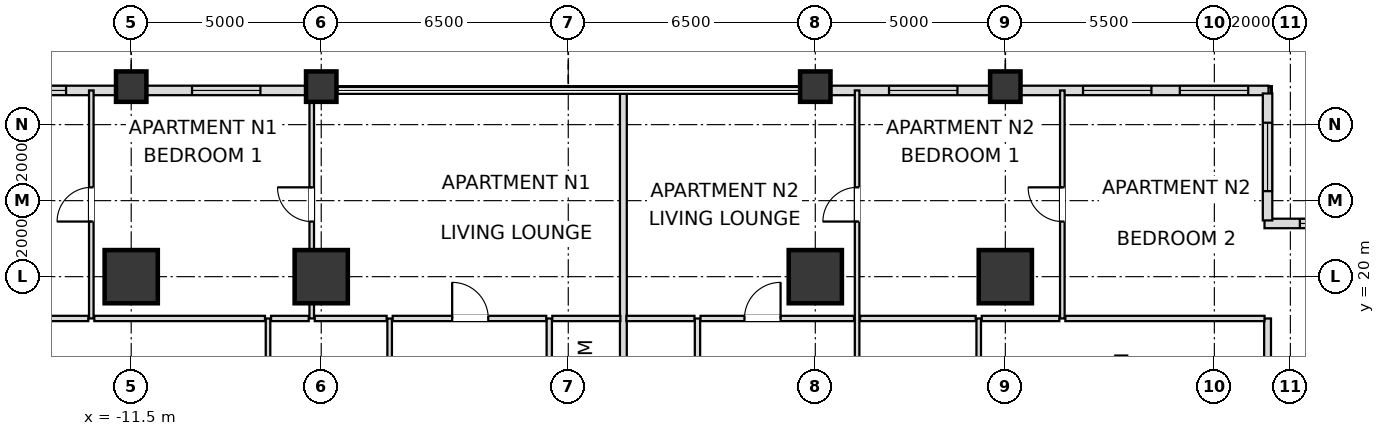
"""IFC4 building model, lengths in metres.
Left out: names, types, materials, properties, quantities, classifications, styles, units other than length and angle.
Written with IfcOpenShell. Run it as: python <this file> out.ifc"""

import sys

from ifc_helpers import new_model, si_unit, direction, frame, frame_2d, origin, origin_2d, place, context, subcontext, project, spatial, rectangle, extrude, element, fill, save


model = new_model("IFC4")
c1 = context("Model", 3, precision=1e-05, world=origin(), true_north=direction((0.0, 1.0)))
c2 = subcontext(c1, "Body", "Model", "MODEL_VIEW")
j1 = project(units=[si_unit("LENGTHUNIT", "METRE"), si_unit("PLANEANGLEUNIT", "RADIAN")], contexts=[c1])
p1 = place(None, origin())
s1 = spatial("IfcSite", under=j1, at=p1, CompositionType="ELEMENT")
p2 = place(p1, origin())
s2 = spatial("IfcBuilding", under=s1, at=p2, CompositionType="ELEMENT")
p3 = place(p2, frame((0.0, 0.0, 27.6)))
s3 = spatial("IfcBuildingStorey", under=s2, at=p3, CompositionType="ELEMENT", Elevation=27.6)
for number, where, z_axis, x_axis in (
    (1, (11.5, 20.0, 0.0), (0.0, 0.0, 1.0), (1.0, 0.0, 0.0)),
    (2, (6.5, 20.0, 0.0), (0.0, 0.0, 1.0), (1.0, 0.0, 0.0)),
    (3, (-6.5, 20.0, 0.0), (0.0, 0.0, 1.0), (1.0, 0.0, 0.0)),
    (4, (-11.5, 20.0, 0.0), (0.0, 0.0, 1.0), (1.0, 0.0, 0.0)),
):
    element("IfcColumn", number, at=place(p3, frame(where, z_axis=z_axis, x_axis=x_axis)), inside=s3, PredefinedType="USERDEFINED", context=c2, shape_type="SweptSolid", body=[
        extrude(rectangle(XDim=1.4, YDim=1.4, at=origin_2d()), origin(), (0.0, 0.0, 1.0), 4.8),
    ])
for number, where, z_axis, x_axis in (
    (5, (-11.5, 25.0, 0.0), (0.0, 0.0, 1.0), (1.0, 0.0, 0.0)),
    (6, (-6.5, 25.0, 0.0), (0.0, 0.0, 1.0), (1.0, 0.0, 0.0)),
    (7, (6.5, 25.0, 0.0), (0.0, 0.0, 1.0), (1.0, 0.0, 0.0)),
    (8, (11.5, 25.0, 0.0), (0.0, 0.0, 1.0), (1.0, 0.0, 0.0)),
):
    element("IfcColumn", number, at=place(p3, frame(where, z_axis=z_axis, x_axis=x_axis)), inside=s3, PredefinedType="COLUMN", context=c2, shape_type="SweptSolid", body=[
        extrude(rectangle(XDim=0.8, YDim=0.8, at=origin_2d()), origin(), (0.0, 0.0, 1.0), 4.8),
    ])
p4 = place(p3, frame((18.425, 24.9, 0.0), z_axis=(0.0, 0.0, 1.0), x_axis=(-1.0, 0.0, 0.0)))
e9 = element("IfcWall", 9, at=p4, inside=s3, PredefinedType="SOLIDWALL", context=c2, shape_type="SweptSolid", body=[
    extrude(rectangle(XDim=6.53, YDim=0.25, at=frame_2d((3.265, 0.0))), origin(), (0.0, 0.0, 1.0), 3.936),
])
p5 = place(p4, frame((0.534, 0.0, 0.72)))
e10 = element("IfcOpeningElement", 10, at=p5, cuts=e9, PredefinedType="OPENING", context=c2, shape_type="SweptSolid", body=[
    extrude(rectangle(XDim=1.8, YDim=1.68, at=frame_2d((0.9, 0.84))), frame((0.0, 0.135, 0.0), z_axis=(0.0, -1.0, 0.0), x_axis=(1.0, 0.0, 0.0)), (0.0, 0.0, 1.0), 0.27),
])
p6 = place(p4, frame((3.081, 0.0, 0.72)))
e11 = element("IfcOpeningElement", 11, at=p6, cuts=e9, PredefinedType="OPENING", context=c2, shape_type="SweptSolid", body=[
    extrude(rectangle(XDim=1.8, YDim=1.68, at=frame_2d((0.9, 0.84))), frame((0.0, 0.135, 0.0), z_axis=(0.0, -1.0, 0.0), x_axis=(1.0, 0.0, 0.0)), (0.0, 0.0, 1.0), 0.27),
])
p7 = place(p3, frame((11.105, 24.9, 0.0), z_axis=(0.0, 0.0, 1.0), x_axis=(-1.0, 0.0, 0.0)))
e12 = element("IfcWall", 12, at=p7, inside=s3, PredefinedType="SOLIDWALL", context=c2, shape_type="SweptSolid", body=[
    extrude(rectangle(XDim=4.21, YDim=0.25, at=frame_2d((2.105, 0.0))), origin(), (0.0, 0.0, 1.0), 3.936),
])
p8 = place(p7, frame((0.865, 0.0, 0.72)))
e13 = element("IfcOpeningElement", 13, at=p8, cuts=e12, PredefinedType="OPENING", context=c2, shape_type="SweptSolid", body=[
    extrude(rectangle(XDim=1.8, YDim=1.68, at=frame_2d((0.9, 0.84))), frame((0.0, 0.135, 0.0), z_axis=(0.0, -1.0, 0.0), x_axis=(1.0, 0.0, 0.0)), (0.0, 0.0, 1.0), 0.27),
])
p9 = place(p3, frame((-6.895, 24.9, 0.0), z_axis=(0.0, 0.0, 1.0), x_axis=(-1.0, 0.0, 0.0)))
e14 = element("IfcWall", 14, at=p9, inside=s3, PredefinedType="SOLIDWALL", context=c2, shape_type="SweptSolid", body=[
    extrude(rectangle(XDim=4.21, YDim=0.25, at=frame_2d((2.105, 0.0))), origin(), (0.0, 0.0, 1.0), 3.936),
])
p10 = place(p9, frame((1.205, 0.0, 0.72)))
e15 = element("IfcOpeningElement", 15, at=p10, cuts=e14, PredefinedType="OPENING", context=c2, shape_type="SweptSolid", body=[
    extrude(rectangle(XDim=1.8, YDim=1.68, at=frame_2d((0.9, 0.84))), frame((0.0, 0.135, 0.0), z_axis=(0.0, -1.0, 0.0), x_axis=(1.0, 0.0, 0.0)), (0.0, 0.0, 1.0), 0.27),
])
p11 = place(p3, frame((-11.895, 24.9, 0.0), z_axis=(0.0, 0.0, 1.0), x_axis=(-1.0, 0.0, 0.0)))
e16 = element("IfcWall", 16, at=p11, inside=s3, PredefinedType="SOLIDWALL", context=c2, shape_type="SweptSolid", body=[
    extrude(rectangle(XDim=6.53, YDim=0.25, at=frame_2d((3.265, 0.0))), origin(), (0.0, 0.0, 1.0), 3.936),
])
p12 = place(p11, frame((1.319, 0.0, 0.72)))
e17 = element("IfcOpeningElement", 17, at=p12, cuts=e16, PredefinedType="OPENING", context=c2, shape_type="SweptSolid", body=[
    extrude(rectangle(XDim=1.8, YDim=1.68, at=frame_2d((0.9, 0.84))), frame((0.0, 0.135, 0.0), z_axis=(0.0, -1.0, 0.0), x_axis=(1.0, 0.0, 0.0)), (0.0, 0.0, 1.0), 0.27),
])
p13 = place(p11, frame((4.086, 0.0, 0.72)))
e18 = element("IfcOpeningElement", 18, at=p13, cuts=e16, PredefinedType="OPENING", context=c2, shape_type="SweptSolid", body=[
    extrude(rectangle(XDim=1.8, YDim=1.68, at=frame_2d((0.9, 0.84))), frame((0.0, 0.135, 0.0), z_axis=(0.0, -1.0, 0.0), x_axis=(1.0, 0.0, 0.0)), (0.0, 0.0, 1.0), 0.27),
])
p14 = place(p3, frame((21.98, 21.4, 0.0), z_axis=(0.0, 0.0, 1.0), x_axis=(-1.0, 0.0, 0.0)))
e19 = element("IfcWall", 19, at=p14, inside=s3, PredefinedType="SOLIDWALL", context=c2, shape_type="SweptSolid", body=[
    extrude(rectangle(XDim=3.66, YDim=0.25, at=frame_2d((1.83, 0.0))), origin(), (0.0, 0.0, 1.0), 3.936),
])
p15 = place(p14, frame((0.93, 0.0, 0.72)))
e20 = element("IfcOpeningElement", 20, at=p15, cuts=e19, PredefinedType="OPENING", context=c2, shape_type="SweptSolid", body=[
    extrude(rectangle(XDim=1.8, YDim=1.68, at=frame_2d((0.9, 0.84))), frame((0.0, 0.135, 0.0), z_axis=(0.0, -1.0, 0.0), x_axis=(1.0, 0.0, 0.0)), (0.0, 0.0, 1.0), 0.27),
])
p16 = place(p3, frame((18.4, 21.48, 0.0), z_axis=(0.0, 0.0, 1.0), x_axis=(0.0, 1.0, 0.0)))
e21 = element("IfcWall", 21, at=p16, inside=s3, PredefinedType="SOLIDWALL", context=c2, shape_type="SweptSolid", body=[
    extrude(rectangle(XDim=3.34, YDim=0.25, at=frame_2d((1.67, 0.0))), origin(), (0.0, 0.0, 1.0), 3.936),
])
p17 = place(p16, frame((0.77, 0.0, 0.72)))
e22 = element("IfcOpeningElement", 22, at=p17, cuts=e21, PredefinedType="OPENING", context=c2, shape_type="SweptSolid", body=[
    extrude(rectangle(XDim=1.8, YDim=1.68, at=frame_2d((0.9, 0.84))), frame((0.0, 0.135, 0.0), z_axis=(0.0, -1.0, 0.0), x_axis=(1.0, 0.0, 0.0)), (0.0, 0.0, 1.0), 0.27),
])
p18 = place(p3, frame((-12.55, 18.9, 0.0), z_axis=(0.0, 0.0, 1.0), x_axis=(0.0, 1.0, 0.0)))
e23 = element("IfcWall", 23, at=p18, inside=s3, PredefinedType="PARTITIONING", context=c2, shape_type="SweptSolid", body=[
    extrude(rectangle(XDim=6.0, YDim=0.12, at=frame_2d((3.0, 0.0))), origin(), (0.0, 0.0, 1.0), 3.936),
])
p19 = place(p18, frame((2.55, 0.0, 0.0)))
e24 = element("IfcOpeningElement", 24, at=p19, cuts=e23, PredefinedType="OPENING", context=c2, shape_type="SweptSolid", body=[
    extrude(rectangle(XDim=0.9, YDim=2.1, at=frame_2d((0.45, 1.05))), frame((0.0, 0.07, 0.0), z_axis=(0.0, -1.0, 0.0), x_axis=(1.0, 0.0, 0.0)), (0.0, 0.0, 1.0), 0.14),
])
p20 = place(p3, frame((-7.9, 9.3, 0.0), z_axis=(0.0, 0.0, 1.0), x_axis=(0.0, 1.0, 0.0)))
e25 = element("IfcWall", 25, at=p20, inside=s3, PredefinedType="PARTITIONING", context=c2, shape_type="SweptSolid", body=[
    extrude(rectangle(XDim=9.6, YDim=0.12, at=frame_2d((4.8, 0.0))), origin(), (0.0, 0.0, 1.0), 4.016),
])
p21 = place(p20, frame((4.35, 0.0, 0.0)))
e26 = element("IfcOpeningElement", 26, at=p21, cuts=e25, PredefinedType="OPENING", context=c2, shape_type="SweptSolid", body=[
    extrude(rectangle(XDim=0.9, YDim=2.1, at=frame_2d((0.45, 1.05))), frame((0.0, 0.07, 0.0), z_axis=(0.0, -1.0, 0.0), x_axis=(1.0, 0.0, 0.0)), (0.0, 0.0, 1.0), 0.14),
])
p22 = place(p3, frame((-6.75, 18.9, 0.0), z_axis=(0.0, 0.0, 1.0), x_axis=(0.0, 1.0, 0.0)))
e27 = element("IfcWall", 27, at=p22, inside=s3, PredefinedType="PARTITIONING", context=c2, shape_type="SweptSolid", body=[
    extrude(rectangle(XDim=6.0, YDim=0.12, at=frame_2d((3.0, 0.0))), origin(), (0.0, 0.0, 1.0), 4.016),
])
p23 = place(p22, frame((2.55, 0.0, 0.0)))
e28 = element("IfcOpeningElement", 28, at=p23, cuts=e27, PredefinedType="OPENING", context=c2, shape_type="SweptSolid", body=[
    extrude(rectangle(XDim=0.9, YDim=2.1, at=frame_2d((0.45, 1.05))), frame((0.0, 0.07, 0.0), z_axis=(0.0, -1.0, 0.0), x_axis=(1.0, 0.0, 0.0)), (0.0, 0.0, 1.0), 0.14),
])
p24 = place(p3, frame((-4.7, 9.3, 0.0), z_axis=(0.0, 0.0, 1.0), x_axis=(0.0, 1.0, 0.0)))
e29 = element("IfcWall", 29, at=p24, inside=s3, PredefinedType="PARTITIONING", context=c2, shape_type="SweptSolid", body=[
    extrude(rectangle(XDim=9.6, YDim=0.12, at=frame_2d((4.8, 0.0))), origin(), (0.0, 0.0, 1.0), 4.148),
])
p25 = place(p24, frame((4.325, 0.0, 0.0)))
e30 = element("IfcOpeningElement", 30, at=p25, cuts=e29, PredefinedType="OPENING", context=c2, shape_type="SweptSolid", body=[
    extrude(rectangle(XDim=0.95, YDim=2.1, at=frame_2d((0.475, 1.05))), frame((0.0, 0.07, 0.0), z_axis=(0.0, -1.0, 0.0), x_axis=(1.0, 0.0, 0.0)), (0.0, 0.0, 1.0), 0.14),
])
p26 = place(p3, frame((-0.5, 9.3, 0.0), z_axis=(0.0, 0.0, 1.0), x_axis=(0.0, 1.0, 0.0)))
e31 = element("IfcWall", 31, at=p26, inside=s3, PredefinedType="PARTITIONING", context=c2, shape_type="SweptSolid", body=[
    extrude(rectangle(XDim=9.6, YDim=0.14, at=frame_2d((4.8, 0.0))), origin(), (0.0, 0.0, 1.0), 4.148),
])
p27 = place(p26, frame((4.35, 0.0, 0.0)))
e32 = element("IfcOpeningElement", 32, at=p27, cuts=e31, PredefinedType="OPENING", context=c2, shape_type="SweptSolid", body=[
    extrude(rectangle(XDim=0.9, YDim=2.1, at=frame_2d((0.45, 1.05))), frame((0.0, 0.08, 0.0), z_axis=(0.0, -1.0, 0.0), x_axis=(1.0, 0.0, 0.0)), (0.0, 0.0, 1.0), 0.16),
])
p28 = place(p3, frame((1.45, 9.3, 0.0), z_axis=(0.0, 0.0, 1.0), x_axis=(0.0, 1.0, 0.0)))
e33 = element("IfcWall", 33, at=p28, inside=s3, PredefinedType="PARTITIONING", context=c2, shape_type="SweptSolid", body=[
    extrude(rectangle(XDim=15.6, YDim=0.18, at=frame_2d((7.8, 0.0))), origin(), (0.0, 0.0, 1.0), 4.016),
])
p29 = place(p3, frame((3.4, 9.3, 0.0), z_axis=(0.0, 0.0, 1.0), x_axis=(0.0, 1.0, 0.0)))
e34 = element("IfcWall", 34, at=p29, inside=s3, PredefinedType="PARTITIONING", context=c2, shape_type="SweptSolid", body=[
    extrude(rectangle(XDim=9.6, YDim=0.14, at=frame_2d((4.8, 0.0))), origin(), (0.0, 0.0, 1.0), 4.148),
])
p30 = place(p29, frame((4.35, 0.0, 0.0)))
e35 = element("IfcOpeningElement", 35, at=p30, cuts=e34, PredefinedType="OPENING", context=c2, shape_type="SweptSolid", body=[
    extrude(rectangle(XDim=0.9, YDim=2.1, at=frame_2d((0.45, 1.05))), frame((0.0, 0.08, 0.0), z_axis=(0.0, -1.0, 0.0), x_axis=(1.0, 0.0, 0.0)), (0.0, 0.0, 1.0), 0.16),
])
p31 = place(p3, frame((7.6, 9.3, 0.0), z_axis=(0.0, 0.0, 1.0), x_axis=(0.0, 1.0, 0.0)))
e36 = element("IfcWall", 36, at=p31, inside=s3, PredefinedType="PARTITIONING", context=c2, shape_type="SweptSolid", body=[
    extrude(rectangle(XDim=15.6, YDim=0.12, at=frame_2d((7.8, 0.0))), origin(), (0.0, 0.0, 1.0), 4.016),
])
p32 = place(p31, frame((4.325, 0.0, 0.0)))
e37 = element("IfcOpeningElement", 37, at=p32, cuts=e36, PredefinedType="OPENING", context=c2, shape_type="SweptSolid", body=[
    extrude(rectangle(XDim=0.95, YDim=2.1, at=frame_2d((0.475, 1.05))), frame((0.0, 0.07, 0.0), z_axis=(0.0, -1.0, 0.0), x_axis=(1.0, 0.0, 0.0)), (0.0, 0.0, 1.0), 0.14),
])
p33 = place(p31, frame((12.15, 0.0, 0.0)))
e38 = element("IfcOpeningElement", 38, at=p33, cuts=e36, PredefinedType="OPENING", context=c2, shape_type="SweptSolid", body=[
    extrude(rectangle(XDim=0.9, YDim=2.1, at=frame_2d((0.45, 1.05))), frame((0.0, 0.07, 0.0), z_axis=(0.0, -1.0, 0.0), x_axis=(1.0, 0.0, 0.0)), (0.0, 0.0, 1.0), 0.14),
])
p34 = place(p3, frame((10.8, 9.3, 0.0), z_axis=(0.0, 0.0, 1.0), x_axis=(0.0, 1.0, 0.0)))
e39 = element("IfcWall", 39, at=p34, inside=s3, PredefinedType="PARTITIONING", context=c2, shape_type="SweptSolid", body=[
    extrude(rectangle(XDim=9.6, YDim=0.12, at=frame_2d((4.8, 0.0))), origin(), (0.0, 0.0, 1.0), 4.016),
])
p35 = place(p34, frame((4.325, 0.0, 0.0)))
e40 = element("IfcOpeningElement", 40, at=p35, cuts=e39, PredefinedType="OPENING", context=c2, shape_type="SweptSolid", body=[
    extrude(rectangle(XDim=0.95, YDim=2.1, at=frame_2d((0.475, 1.05))), frame((0.0, 0.07, 0.0), z_axis=(0.0, -1.0, 0.0), x_axis=(1.0, 0.0, 0.0)), (0.0, 0.0, 1.0), 0.14),
])
p36 = place(p3, frame((13.0, 18.9, 0.0), z_axis=(0.0, 0.0, 1.0), x_axis=(0.0, 1.0, 0.0)))
e41 = element("IfcWall", 41, at=p36, inside=s3, PredefinedType="PARTITIONING", context=c2, shape_type="SweptSolid", body=[
    extrude(rectangle(XDim=6.0, YDim=0.12, at=frame_2d((3.0, 0.0))), origin(), (0.0, 0.0, 1.0), 3.936),
])
p37 = place(p36, frame((2.55, 0.0, 0.0)))
e42 = element("IfcOpeningElement", 42, at=p37, cuts=e41, PredefinedType="OPENING", context=c2, shape_type="SweptSolid", body=[
    extrude(rectangle(XDim=0.9, YDim=2.1, at=frame_2d((0.45, 1.05))), frame((0.0, 0.07, 0.0), z_axis=(0.0, -1.0, 0.0), x_axis=(1.0, 0.0, 0.0)), (0.0, 0.0, 1.0), 0.14),
])
p38 = place(p3, frame((18.4, 9.3, 0.0), z_axis=(0.0, 0.0, 1.0), x_axis=(0.0, 1.0, 0.0)))
e43 = element("IfcWall", 43, at=p38, inside=s3, PredefinedType="PARTITIONING", context=c2, shape_type="SweptSolid", body=[
    extrude(rectangle(XDim=9.6, YDim=0.18, at=frame_2d((4.8, 0.0))), origin(), (0.0, 0.0, 1.0), 3.936),
])
p39 = place(p3, frame((-18.32, 18.9, 0.0), z_axis=(0.0, 0.0, 1.0), x_axis=(1.0, 0.0, 0.0)))
e44 = element("IfcWall", 44, at=p39, inside=s3, PredefinedType="PARTITIONING", context=c2, shape_type="SweptSolid", body=[
    extrude(rectangle(XDim=5.69, YDim=0.14, at=frame_2d((2.845, 0.0))), origin(), (0.0, 0.0, 1.0), 3.936),
])
p40 = place(p3, frame((-12.47, 18.9, 0.0), z_axis=(0.0, 0.0, 1.0), x_axis=(1.0, 0.0, 0.0)))
e45 = element("IfcWall", 45, at=p40, inside=s3, PredefinedType="PARTITIONING", context=c2, shape_type="SweptSolid", body=[
    extrude(rectangle(XDim=4.49, YDim=0.14, at=frame_2d((2.245, 0.0))), origin(), (0.0, 0.0, 1.0), 3.936),
])
p41 = place(p3, frame((-7.82, 18.9, 0.0), z_axis=(0.0, 0.0, 1.0), x_axis=(1.0, 0.0, 0.0)))
e46 = element("IfcWall", 46, at=p41, inside=s3, PredefinedType="PARTITIONING", context=c2, shape_type="SweptSolid", body=[
    extrude(rectangle(XDim=0.99, YDim=0.14, at=frame_2d((0.495, 0.0))), origin(), (0.0, 0.0, 1.0), 4.58),
])
p42 = place(p3, frame((-6.67, 18.9, 0.0), z_axis=(0.0, 0.0, 1.0), x_axis=(1.0, 0.0, 0.0)))
e47 = element("IfcWall", 47, at=p42, inside=s3, PredefinedType="PARTITIONING", context=c2, shape_type="SweptSolid", body=[
    extrude(rectangle(XDim=1.89, YDim=0.14, at=frame_2d((0.945, 0.0))), origin(), (0.0, 0.0, 1.0), 4.016),
])
p43 = place(p3, frame((-4.62, 18.9, 0.0), z_axis=(0.0, 0.0, 1.0), x_axis=(1.0, 0.0, 0.0)))
e48 = element("IfcWall", 48, at=p43, inside=s3, PredefinedType="PARTITIONING", context=c2, shape_type="SweptSolid", body=[
    extrude(rectangle(XDim=4.04, YDim=0.14, at=frame_2d((2.02, 0.0))), origin(), (0.0, 0.0, 1.0), 4.58),
])
p44 = place(p43, frame((1.565, 0.0, 0.0)))
e49 = element("IfcOpeningElement", 49, at=p44, cuts=e48, PredefinedType="OPENING", context=c2, shape_type="SweptSolid", body=[
    extrude(rectangle(XDim=0.95, YDim=2.1, at=frame_2d((0.475, 1.05))), frame((0.0, 0.08, 0.0), z_axis=(0.0, -1.0, 0.0), x_axis=(1.0, 0.0, 0.0)), (0.0, 0.0, 1.0), 0.16),
])
for number, where, z_axis, x_axis in (
    (50, (-0.42, 18.9, 0.0), (0.0, 0.0, 1.0), (1.0, 0.0, 0.0)),
    (51, (1.53, 18.9, 0.0), (0.0, 0.0, 1.0), (1.0, 0.0, 0.0)),
):
    element("IfcWall", number, at=place(p3, frame(where, z_axis=z_axis, x_axis=x_axis)), inside=s3, PredefinedType="PARTITIONING", context=c2, shape_type="SweptSolid", body=[
        extrude(rectangle(XDim=1.79, YDim=0.14, at=frame_2d((0.895, 0.0))), origin(), (0.0, 0.0, 1.0), 4.58),
    ])
p45 = place(p3, frame((3.48, 18.9, 0.0), z_axis=(0.0, 0.0, 1.0), x_axis=(1.0, 0.0, 0.0)))
e52 = element("IfcWall", 52, at=p45, inside=s3, PredefinedType="PARTITIONING", context=c2, shape_type="SweptSolid", body=[
    extrude(rectangle(XDim=4.04, YDim=0.14, at=frame_2d((2.02, 0.0))), origin(), (0.0, 0.0, 1.0), 4.016),
])
p46 = place(p45, frame((1.156, 0.0, 0.0)))
e53 = element("IfcOpeningElement", 53, at=p46, cuts=e52, PredefinedType="OPENING", context=c2, shape_type="SweptSolid", body=[
    extrude(rectangle(XDim=0.95, YDim=2.1, at=frame_2d((0.475, 1.05))), frame((0.0, 0.08, 0.0), z_axis=(0.0, -1.0, 0.0), x_axis=(1.0, 0.0, 0.0)), (0.0, 0.0, 1.0), 0.16),
])
p47 = place(p3, frame((7.68, 18.9, 0.0), z_axis=(0.0, 0.0, 1.0), x_axis=(1.0, 0.0, 0.0)))
e54 = element("IfcWall", 54, at=p47, inside=s3, PredefinedType="PARTITIONING", context=c2, shape_type="SweptSolid", body=[
    extrude(rectangle(XDim=3.04, YDim=0.14, at=frame_2d((1.52, 0.0))), origin(), (0.0, 0.0, 1.0), 4.58),
])
p48 = place(p3, frame((10.88, 18.9, 0.0), z_axis=(0.0, 0.0, 1.0), x_axis=(1.0, 0.0, 0.0)))
e55 = element("IfcWall", 55, at=p48, inside=s3, PredefinedType="PARTITIONING", context=c2, shape_type="SweptSolid", body=[
    extrude(rectangle(XDim=2.04, YDim=0.14, at=frame_2d((1.02, 0.0))), origin(), (0.0, 0.0, 1.0), 3.936),
])
p49 = place(p3, frame((13.08, 18.9, 0.0), z_axis=(0.0, 0.0, 1.0), x_axis=(1.0, 0.0, 0.0)))
e56 = element("IfcWall", 56, at=p49, inside=s3, PredefinedType="PARTITIONING", context=c2, shape_type="SweptSolid", body=[
    extrude(rectangle(XDim=5.24, YDim=0.14, at=frame_2d((2.62, 0.0))), origin(), (0.0, 0.0, 1.0), 3.936),
])
p50 = place(p5, origin())
e57 = element("IfcWindow", 57, at=p50, inside=s3, PartitioningType="SINGLE_PANEL", PredefinedType="WINDOW", context=c2, shape_type="SweptSolid", body=[
    extrude(rectangle(XDim=1.8, YDim=1.68, at=frame_2d((0.9, 0.84))), frame((0.0, 0.03, 0.0), z_axis=(0.0, -1.0, 0.0), x_axis=(1.0, 0.0, 0.0)), (0.0, 0.0, 1.0), 0.06),
])
fill(e10, e57)
p51 = place(p6, origin())
e58 = element("IfcWindow", 58, at=p51, inside=s3, PartitioningType="SINGLE_PANEL", PredefinedType="WINDOW", context=c2, shape_type="SweptSolid", body=[
    extrude(rectangle(XDim=1.8, YDim=1.68, at=frame_2d((0.9, 0.84))), frame((0.0, 0.03, 0.0), z_axis=(0.0, -1.0, 0.0), x_axis=(1.0, 0.0, 0.0)), (0.0, 0.0, 1.0), 0.06),
])
fill(e11, e58)
p52 = place(p8, origin())
e59 = element("IfcWindow", 59, at=p52, inside=s3, PartitioningType="SINGLE_PANEL", PredefinedType="WINDOW", context=c2, shape_type="SweptSolid", body=[
    extrude(rectangle(XDim=1.8, YDim=1.68, at=frame_2d((0.9, 0.84))), frame((0.0, 0.03, 0.0), z_axis=(0.0, -1.0, 0.0), x_axis=(1.0, 0.0, 0.0)), (0.0, 0.0, 1.0), 0.06),
])
fill(e13, e59)
p53 = place(p10, origin())
e60 = element("IfcWindow", 60, at=p53, inside=s3, PartitioningType="SINGLE_PANEL", PredefinedType="WINDOW", context=c2, shape_type="SweptSolid", body=[
    extrude(rectangle(XDim=1.8, YDim=1.68, at=frame_2d((0.9, 0.84))), frame((0.0, 0.03, 0.0), z_axis=(0.0, -1.0, 0.0), x_axis=(1.0, 0.0, 0.0)), (0.0, 0.0, 1.0), 0.06),
])
fill(e15, e60)
p54 = place(p12, origin())
e61 = element("IfcWindow", 61, at=p54, inside=s3, PartitioningType="SINGLE_PANEL", PredefinedType="WINDOW", context=c2, shape_type="SweptSolid", body=[
    extrude(rectangle(XDim=1.8, YDim=1.68, at=frame_2d((0.9, 0.84))), frame((0.0, 0.03, 0.0), z_axis=(0.0, -1.0, 0.0), x_axis=(1.0, 0.0, 0.0)), (0.0, 0.0, 1.0), 0.06),
])
fill(e17, e61)
p55 = place(p15, origin())
e62 = element("IfcWindow", 62, at=p55, inside=s3, PartitioningType="SINGLE_PANEL", PredefinedType="WINDOW", context=c2, shape_type="SweptSolid", body=[
    extrude(rectangle(XDim=1.8, YDim=1.68, at=frame_2d((0.9, 0.84))), frame((0.0, 0.03, 0.0), z_axis=(0.0, -1.0, 0.0), x_axis=(1.0, 0.0, 0.0)), (0.0, 0.0, 1.0), 0.06),
])
fill(e20, e62)
p56 = place(p17, origin())
e63 = element("IfcWindow", 63, at=p56, inside=s3, PartitioningType="SINGLE_PANEL", PredefinedType="WINDOW", context=c2, shape_type="SweptSolid", body=[
    extrude(rectangle(XDim=1.8, YDim=1.68, at=frame_2d((0.9, 0.84))), frame((0.0, 0.03, 0.0), z_axis=(0.0, -1.0, 0.0), x_axis=(1.0, 0.0, 0.0)), (0.0, 0.0, 1.0), 0.06),
])
fill(e22, e63)
p57 = place(p44, origin())
e64 = element("IfcDoor", 64, at=p57, inside=s3, OperationType="SINGLE_SWING_LEFT", PredefinedType="DOOR", context=c2, shape_type="SweptSolid", body=[
    extrude(rectangle(XDim=0.95, YDim=2.1, at=frame_2d((0.475, 1.05))), frame((0.0, 0.025, 0.0), z_axis=(0.0, -1.0, 0.0), x_axis=(1.0, 0.0, 0.0)), (0.0, 0.0, 1.0), 0.05),
])
fill(e49, e64)
p58 = place(p23, origin())
e65 = element("IfcDoor", 65, at=p58, inside=s3, OperationType="SINGLE_SWING_RIGHT", PredefinedType="DOOR", context=c2, shape_type="SweptSolid", body=[
    extrude(rectangle(XDim=0.9, YDim=2.1, at=frame_2d((0.45, 1.05))), frame((0.0, 0.025, 0.0), z_axis=(0.0, -1.0, 0.0), x_axis=(1.0, 0.0, 0.0)), (0.0, 0.0, 1.0), 0.05),
])
fill(e28, e65)
p59 = place(p19, origin())
e66 = element("IfcDoor", 66, at=p59, inside=s3, OperationType="SINGLE_SWING_LEFT", PredefinedType="DOOR", context=c2, shape_type="SweptSolid", body=[
    extrude(rectangle(XDim=0.9, YDim=2.1, at=frame_2d((0.45, 1.05))), frame((0.0, 0.025, 0.0), z_axis=(0.0, -1.0, 0.0), x_axis=(1.0, 0.0, 0.0)), (0.0, 0.0, 1.0), 0.05),
])
fill(e24, e66)
p60 = place(p46, origin())
e67 = element("IfcDoor", 67, at=p60, inside=s3, OperationType="SINGLE_SWING_RIGHT", PredefinedType="DOOR", context=c2, shape_type="SweptSolid", body=[
    extrude(rectangle(XDim=0.95, YDim=2.1, at=frame_2d((0.475, 1.05))), frame((0.0, 0.025, 0.0), z_axis=(0.0, -1.0, 0.0), x_axis=(1.0, 0.0, 0.0)), (0.0, 0.0, 1.0), 0.05),
])
fill(e53, e67)
p61 = place(p33, origin())
e68 = element("IfcDoor", 68, at=p61, inside=s3, OperationType="SINGLE_SWING_LEFT", PredefinedType="DOOR", context=c2, shape_type="SweptSolid", body=[
    extrude(rectangle(XDim=0.9, YDim=2.1, at=frame_2d((0.45, 1.05))), frame((0.0, 0.025, 0.0), z_axis=(0.0, -1.0, 0.0), x_axis=(1.0, 0.0, 0.0)), (0.0, 0.0, 1.0), 0.05),
])
fill(e38, e68)
p62 = place(p37, origin())
e69 = element("IfcDoor", 69, at=p62, inside=s3, OperationType="SINGLE_SWING_RIGHT", PredefinedType="DOOR", context=c2, shape_type="SweptSolid", body=[
    extrude(rectangle(XDim=0.9, YDim=2.1, at=frame_2d((0.45, 1.05))), frame((0.0, 0.025, 0.0), z_axis=(0.0, -1.0, 0.0), x_axis=(1.0, 0.0, 0.0)), (0.0, 0.0, 1.0), 0.05),
])
fill(e42, e69)
save(model, sys.argv[1])
